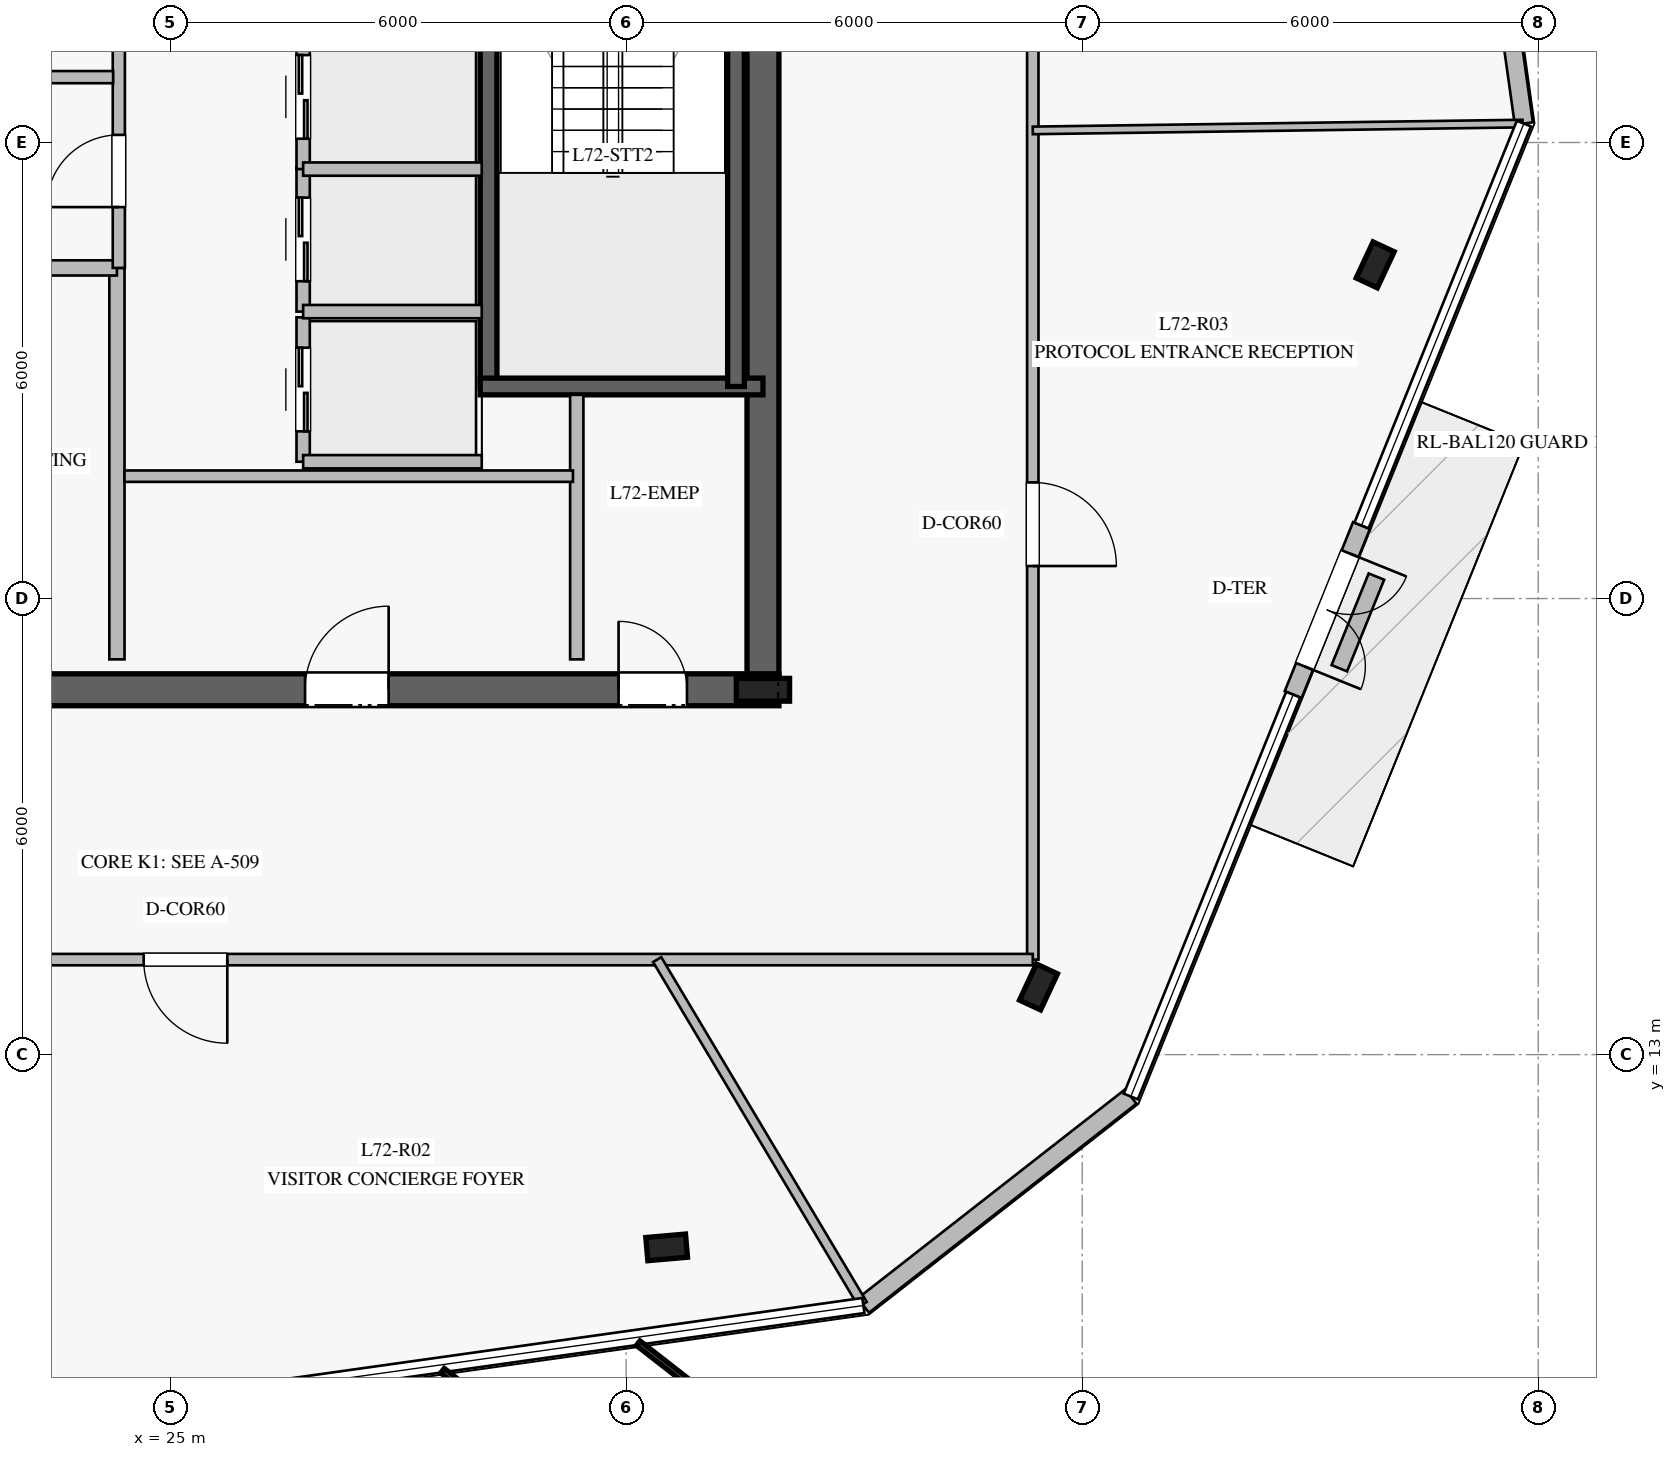
"""IFC4 building model, lengths in metres.
Left out: names, types, materials, properties, quantities, classifications, styles, units other than length and angle.
Written with IfcOpenShell. Run it as: python <this file> out.ifc"""

import sys

from ifc_helpers import new_model, si_unit, direction, frame, frame_2d, origin, origin_2d, place, context, subcontext, project, spatial, rectangle, i_section, extrude, element, fill, save


model = new_model("IFC4")
c1 = context("Model", 3, precision=1e-05, world=origin(), true_north=direction((0.0, 1.0)))
c2 = subcontext(c1, "Body", "Model", "MODEL_VIEW")
j1 = project(units=[si_unit("LENGTHUNIT", "METRE"), si_unit("PLANEANGLEUNIT", "RADIAN")], contexts=[c1])
p1 = place(None, origin())
s1 = spatial("IfcSite", under=j1, at=p1, CompositionType="ELEMENT")
p2 = place(p1, origin())
s2 = spatial("IfcBuilding", under=s1, at=p2, CompositionType="ELEMENT")
p3 = place(p2, frame((0.0, 0.0, 298.2)))
s3 = spatial("IfcBuildingStorey", under=s2, at=p3, CompositionType="ELEMENT", Elevation=298.2)
p4 = place(p3, frame((16.99, 17.8, 0.0), z_axis=(0.0, 0.0, 1.0), x_axis=(1.0, 0.0, 0.0)))
e1 = element("IfcWall", 1, at=p4, inside=s3, PredefinedType="SHEAR", context=c2, shape_type="SweptSolid", body=[
    extrude(rectangle(XDim=16.02, YDim=0.42, at=frame_2d((8.01, 0.0))), origin(), (0.0, 0.0, 1.0), 3.78),
])
p5 = place(p4, frame((4.96, 0.0, 0.0)))
e2 = element("IfcOpeningElement", 2, at=p5, cuts=e1, PredefinedType="OPENING", context=c2, shape_type="SweptSolid", body=[
    extrude(rectangle(XDim=1.2, YDim=2.25, at=frame_2d((0.6, 1.125))), frame((0.0, 0.22, 0.0), z_axis=(0.0, -1.0, 0.0), x_axis=(1.0, 0.0, 0.0)), (0.0, 0.0, 1.0), 0.44),
])
p6 = place(p4, frame((13.91, 0.0, 0.0)))
e3 = element("IfcOpeningElement", 3, at=p6, cuts=e1, PredefinedType="OPENING", context=c2, shape_type="SweptSolid", body=[
    extrude(rectangle(XDim=0.9, YDim=2.1, at=frame_2d((0.45, 1.05))), frame((0.0, 0.22, 0.0), z_axis=(0.0, -1.0, 0.0), x_axis=(1.0, 0.0, 0.0)), (0.0, 0.0, 1.0), 0.44),
])
p7 = place(p4, frame((9.785, 0.0, 0.0)))
e4 = element("IfcOpeningElement", 4, at=p7, cuts=e1, PredefinedType="OPENING", context=c2, shape_type="SweptSolid", body=[
    extrude(rectangle(XDim=1.1, YDim=2.2, at=frame_2d((0.55, 1.1))), frame((0.0, 0.22, 0.0), z_axis=(0.0, -1.0, 0.0), x_axis=(1.0, 0.0, 0.0)), (0.0, 0.0, 1.0), 0.44),
])
p8 = place(p3, frame((32.8, 18.01, 0.0), z_axis=(0.0, 0.0, 1.0), x_axis=(0.0, 1.0, 0.0)))
e5 = element("IfcWall", 5, at=p8, inside=s3, PredefinedType="SHEAR", context=c2, shape_type="SweptSolid", body=[
    extrude(rectangle(XDim=13.98, YDim=0.42, at=frame_2d((6.99, 0.0))), origin(), (0.0, 0.0, 1.0), 3.78),
])
p9 = place(p3, frame((32.8, 17.8, 0.0), z_axis=(0.0, 0.0, 1.0), x_axis=(1.0, 0.0, 0.0)))
e6 = element("IfcColumn", 6, at=p9, inside=s3, PredefinedType="COLUMN", context=c2, shape_type="SweptSolid", body=[
    extrude(i_section(OverallWidth=0.3, OverallDepth=0.7, WebThickness=0.017, FlangeThickness=0.032, at=origin_2d()), origin(), (0.0, 0.0, 1.0), 4.0),
])
p10 = place(p3, frame((29.19, 21.79, 0.0), z_axis=(0.0, 0.0, 1.0), x_axis=(0.0, 1.0, 0.0)))
e7 = element("IfcWall", 7, at=p10, inside=s3, PredefinedType="SOLIDWALL", context=c2, shape_type="SweptSolid", body=[
    extrude(rectangle(XDim=7.22, YDim=0.22, at=frame_2d((3.61, 0.0))), origin(), (0.0, 0.0, 1.0), 3.78),
])
p11 = place(p10, frame((5.88, 0.0, 0.0)))
e8 = element("IfcOpeningElement", 8, at=p11, cuts=e7, PredefinedType="OPENING", context=c2, shape_type="SweptSolid", body=[
    extrude(rectangle(XDim=1.15, YDim=2.2, at=frame_2d((0.575, 1.1))), frame((0.0, 0.12, 0.0), z_axis=(0.0, -1.0, 0.0), x_axis=(1.0, 0.0, 0.0)), (0.0, 0.0, 1.0), 0.24),
])
p12 = place(p3, frame((29.08, 21.79, 0.0), z_axis=(0.0, 0.0, 1.0), x_axis=(1.0, 0.0, 0.0)))
e9 = element("IfcWall", 9, at=p12, inside=s3, PredefinedType="SOLIDWALL", context=c2, shape_type="SweptSolid", body=[
    extrude(rectangle(XDim=3.72, YDim=0.22, at=frame_2d((1.86, 0.0))), origin(), (0.0, 0.0, 1.0), 3.78),
])
p13 = place(p3, frame((32.445, 29.01, 0.0), z_axis=(0.0, 0.0, 1.0), x_axis=(0.0, -1.0, 0.0)))
e10 = element("IfcWall", 10, at=p13, inside=s3, PredefinedType="SOLIDWALL", context=c2, shape_type="SweptSolid", body=[
    extrude(rectangle(XDim=7.22, YDim=0.22, at=frame_2d((3.61, 0.0))), origin(), (0.0, 0.0, 1.0), 3.78),
])
for number, where, z_axis, x_axis in (
    (11, (31.533, 10.464, 0.0), (0.0, 0.0, 1.0), (0.996, 0.087, 0.0)),
    (12, (36.425, 13.89, 0.0), (0.0, 0.0, 1.0), (0.423, 0.906, 0.0)),
    (13, (40.855, 23.39, 0.0), (0.0, 0.0, 1.0), (0.423, 0.906, 0.0)),
):
    element("IfcColumn", number, at=place(p3, frame(where, z_axis=z_axis, x_axis=x_axis)), inside=s3, PredefinedType="COLUMN", context=c2, shape_type="SweptSolid", body=[
        extrude(i_section(OverallWidth=0.306, OverallDepth=0.524, WebThickness=0.021, FlangeThickness=0.04, at=origin_2d()), origin(), (0.0, 0.0, 1.0), 4.0),
    ])
p14 = place(p3, frame((34.121, 9.699, 0.0), z_axis=(0.0, 0.0, 1.0), x_axis=(0.78792242083, 0.615774519408, 0.0)))
e14 = element("IfcWall", 14, at=p14, inside=s3, PredefinedType="STANDARD", context=c2, shape_type="SweptSolid", body=[
    extrude(rectangle(XDim=4.466, YDim=0.24, at=frame_2d((2.233, 0.0))), origin(), (0.0, 0.0, 1.0), 3.78),
])
p15 = place(p3, frame((39.776, 17.736, 0.0), z_axis=(0.0, 0.0, 1.0), x_axis=(0.374703586724, 0.927144660825, 0.0)))
e15 = element("IfcWall", 15, at=p15, inside=s3, PredefinedType="STANDARD", context=c2, shape_type="SweptSolid", body=[
    extrude(rectangle(XDim=2.4, YDim=0.24, at=frame_2d((1.2, 0.0))), origin(), (0.0, 0.0, 1.0), 3.78),
])
p16 = place(p15, frame((0.4, 0.0, 0.0)))
e16 = element("IfcOpeningElement", 16, at=p16, cuts=e15, PredefinedType="OPENING", context=c2, shape_type="SweptSolid", body=[
    extrude(rectangle(XDim=1.6, YDim=2.25, at=frame_2d((0.8, 1.125))), frame((0.0, 0.13, 0.0), z_axis=(0.0, -1.0, 0.0), x_axis=(1.0, 0.0, 0.0)), (0.0, 0.0, 1.0), 0.26),
])
p17 = place(p3, frame((42.811, 25.249, 0.0), z_axis=(0.0, 0.0, 1.0), x_axis=(-0.139124115192, 0.990274952007, 0.0)))
e17 = element("IfcWall", 17, at=p17, inside=s3, PredefinedType="STANDARD", context=c2, shape_type="SweptSolid", body=[
    extrude(rectangle(XDim=4.464, YDim=0.24, at=frame_2d((2.232, 0.0))), origin(), (0.0, 0.0, 1.0), 3.78),
])
p18 = place(p3, frame((40.383, 18.083, 0.0), z_axis=(0.0, 0.0, 1.0), x_axis=(0.375108300877, 0.926980993663, 0.0)))
e18 = element("IfcWall", 18, at=p18, inside=s3, PredefinedType="USERDEFINED", context=c2, shape_type="SweptSolid", body=[
    extrude(rectangle(XDim=1.301, YDim=0.22, at=frame_2d((0.65, 0.0))), origin(), (0.0, 0.0, 1.0), 0.4),
])
p19 = place(p3, frame((24.3, 18.2, 0.0), z_axis=(0.0, 0.0, 1.0), x_axis=(0.0, 1.0, 0.0)))
e19 = element("IfcWall", 19, at=p19, inside=s3, PredefinedType="PARTITIONING", context=c2, shape_type="SweptSolid", body=[
    extrude(rectangle(XDim=5.15, YDim=0.2, at=frame_2d((2.575, 0.0))), origin(), (0.0, 0.0, 1.0), 3.78),
])
p20 = place(p3, frame((20.92, 23.35, 0.0), z_axis=(0.0, 0.0, 1.0), x_axis=(1.0, 0.0, 0.0)))
e20 = element("IfcWall", 20, at=p20, inside=s3, PredefinedType="PARTITIONING", context=c2, shape_type="SweptSolid", body=[
    extrude(rectangle(XDim=3.38, YDim=0.2, at=frame_2d((1.69, 0.0))), origin(), (0.0, 0.0, 1.0), 3.78),
])
p21 = place(p3, frame((24.325, 23.35, 0.0), z_axis=(0.0, 0.0, 1.0), x_axis=(0.0, 1.0, 0.0)))
e21 = element("IfcWall", 21, at=p21, inside=s3, PredefinedType="PLUMBINGWALL", context=c2, shape_type="SweptSolid", body=[
    extrude(rectangle(XDim=4.93, YDim=0.16, at=frame_2d((2.465, 0.0))), origin(), (0.0, 0.0, 1.0), 3.78),
])
p22 = place(p21, frame((0.8, 0.0, 0.0)))
e22 = element("IfcOpeningElement", 22, at=p22, cuts=e21, PredefinedType="OPENING", context=c2, shape_type="SweptSolid", body=[
    extrude(rectangle(XDim=0.95, YDim=2.1, at=frame_2d((0.475, 1.05))), frame((0.0, 0.09, 0.0), z_axis=(0.0, -1.0, 0.0), x_axis=(1.0, 0.0, 0.0)), (0.0, 0.0, 1.0), 0.18),
])
p23 = place(p21, frame((3.26, 0.0, 0.0)))
e23 = element("IfcOpeningElement", 23, at=p23, cuts=e21, PredefinedType="OPENING", context=c2, shape_type="SweptSolid", body=[
    extrude(rectangle(XDim=0.9, YDim=2.1, at=frame_2d((0.45, 1.05))), frame((0.0, 0.09, 0.0), z_axis=(0.0, -1.0, 0.0), x_axis=(1.0, 0.0, 0.0)), (0.0, 0.0, 1.0), 0.18),
])
p24 = place(p3, frame((20.95, 25.86, 0.0), z_axis=(0.0, 0.0, 1.0), x_axis=(1.0, 0.0, 0.0)))
e24 = element("IfcWall", 24, at=p24, inside=s3, PredefinedType="PLUMBINGWALL", context=c2, shape_type="SweptSolid", body=[
    extrude(rectangle(XDim=3.3, YDim=0.16, at=frame_2d((1.65, 0.0))), origin(), (0.0, 0.0, 1.0), 3.78),
])
p25 = place(p3, frame((30.35, 18.2, 0.0), z_axis=(0.0, 0.0, 1.0), x_axis=(0.0, 1.0, 0.0)))
e25 = element("IfcWall", 25, at=p25, inside=s3, PredefinedType="PARTITIONING", context=c2, shape_type="SweptSolid", body=[
    extrude(rectangle(XDim=3.48, YDim=0.175, at=frame_2d((1.74, 0.0))), origin(), (0.0, 0.0, 1.0), 3.78),
])
p26 = place(p3, frame((24.4, 20.61, 0.0), z_axis=(0.0, 0.0, 1.0), x_axis=(1.0, 0.0, 0.0)))
e26 = element("IfcWall", 26, at=p26, inside=s3, PredefinedType="PARTITIONING", context=c2, shape_type="SweptSolid", body=[
    extrude(rectangle(XDim=5.9, YDim=0.15, at=frame_2d((2.95, 0.0))), origin(), (0.0, 0.0, 1.0), 3.78),
])
p27 = place(p3, frame((26.75, 20.8, 0.0), z_axis=(0.0, 0.0, 1.0), x_axis=(0.0, 1.0, 0.0)))
e27 = element("IfcWall", 27, at=p27, inside=s3, PredefinedType="PARTITIONING", context=c2, shape_type="SweptSolid", body=[
    extrude(rectangle(XDim=1.9, YDim=0.175, at=frame_2d((0.95, 0.0))), origin(), (0.0, 0.0, 1.0), 3.78),
])
p28 = place(p27, frame((0.4, 0.0, 0.0)))
e28 = element("IfcOpeningElement", 28, at=p28, cuts=e27, PredefinedType="OPENING", context=c2, shape_type="SweptSolid", body=[
    extrude(rectangle(XDim=1.1, YDim=2.2, at=frame_2d((0.55, 1.1))), frame((0.0, 0.098, 0.0), z_axis=(0.0, -1.0, 0.0), x_axis=(1.0, 0.0, 0.0)), (0.0, 0.0, 1.0), 0.195),
])
p29 = place(p3, frame((26.75, 20.8, 0.0), z_axis=(0.0, 0.0, 1.0), x_axis=(1.0, 0.0, 0.0)))
e29 = element("IfcWall", 29, at=p29, inside=s3, PredefinedType="PARTITIONING", context=c2, shape_type="SweptSolid", body=[
    extrude(rectangle(XDim=2.35, YDim=0.175, at=frame_2d((1.175, 0.0))), origin(), (0.0, 0.0, 1.0), 3.78),
])
p30 = place(p3, frame((26.75, 22.775, 0.0), z_axis=(0.0, 0.0, 1.0), x_axis=(0.0, 1.0, 0.0)))
e30 = element("IfcWall", 30, at=p30, inside=s3, PredefinedType="PARTITIONING", context=c2, shape_type="SweptSolid", body=[
    extrude(rectangle(XDim=1.9, YDim=0.175, at=frame_2d((0.95, 0.0))), origin(), (0.0, 0.0, 1.0), 3.78),
])
p31 = place(p30, frame((0.4, 0.0, 0.0)))
e31 = element("IfcOpeningElement", 31, at=p31, cuts=e30, PredefinedType="OPENING", context=c2, shape_type="SweptSolid", body=[
    extrude(rectangle(XDim=1.1, YDim=2.2, at=frame_2d((0.55, 1.1))), frame((0.0, 0.098, 0.0), z_axis=(0.0, -1.0, 0.0), x_axis=(1.0, 0.0, 0.0)), (0.0, 0.0, 1.0), 0.195),
])
p32 = place(p3, frame((26.75, 22.775, 0.0), z_axis=(0.0, 0.0, 1.0), x_axis=(1.0, 0.0, 0.0)))
e32 = element("IfcWall", 32, at=p32, inside=s3, PredefinedType="PARTITIONING", context=c2, shape_type="SweptSolid", body=[
    extrude(rectangle(XDim=2.35, YDim=0.175, at=frame_2d((1.175, 0.0))), origin(), (0.0, 0.0, 1.0), 3.78),
])
p33 = place(p3, frame((26.75, 24.65, 0.0), z_axis=(0.0, 0.0, 1.0), x_axis=(0.0, 1.0, 0.0)))
e33 = element("IfcWall", 33, at=p33, inside=s3, PredefinedType="PARTITIONING", context=c2, shape_type="SweptSolid", body=[
    extrude(rectangle(XDim=1.9, YDim=0.175, at=frame_2d((0.95, 0.0))), origin(), (0.0, 0.0, 1.0), 3.78),
])
p34 = place(p33, frame((0.4, 0.0, 0.0)))
e34 = element("IfcOpeningElement", 34, at=p34, cuts=e33, PredefinedType="OPENING", context=c2, shape_type="SweptSolid", body=[
    extrude(rectangle(XDim=1.1, YDim=2.2, at=frame_2d((0.55, 1.1))), frame((0.0, 0.098, 0.0), z_axis=(0.0, -1.0, 0.0), x_axis=(1.0, 0.0, 0.0)), (0.0, 0.0, 1.0), 0.195),
])
p35 = place(p3, frame((26.75, 24.65, 0.0), z_axis=(0.0, 0.0, 1.0), x_axis=(1.0, 0.0, 0.0)))
e35 = element("IfcWall", 35, at=p35, inside=s3, PredefinedType="PARTITIONING", context=c2, shape_type="SweptSolid", body=[
    extrude(rectangle(XDim=2.35, YDim=0.175, at=frame_2d((1.175, 0.0))), origin(), (0.0, 0.0, 1.0), 3.78),
])
p36 = place(p3, frame((36.35, 35.75, 0.0), z_axis=(0.0, 0.0, 1.0), x_axis=(0.0, -1.0, 0.0)))
e36 = element("IfcWall", 36, at=p36, inside=s3, PredefinedType="PARTITIONING", context=c2, shape_type="SweptSolid", body=[
    extrude(rectangle(XDim=21.5, YDim=0.15, at=frame_2d((10.75, 0.0))), origin(), (0.0, 0.0, 1.0), 3.25),
])
p37 = place(p36, frame((15.222, 0.0, 0.0)))
e37 = element("IfcOpeningElement", 37, at=p37, cuts=e36, PredefinedType="OPENING", context=c2, shape_type="SweptSolid", body=[
    extrude(rectangle(XDim=1.1, YDim=2.2, at=frame_2d((0.55, 1.1))), frame((0.0, 0.085, 0.0), z_axis=(0.0, -1.0, 0.0), x_axis=(1.0, 0.0, 0.0)), (0.0, 0.0, 1.0), 0.17),
])
p38 = place(p3, frame((36.35, 14.25, 0.0), z_axis=(0.0, 0.0, 1.0), x_axis=(-1.0, 0.0, 0.0)))
e38 = element("IfcWall", 38, at=p38, inside=s3, PredefinedType="PARTITIONING", context=c2, shape_type="SweptSolid", body=[
    extrude(rectangle(XDim=22.7, YDim=0.15, at=frame_2d((11.35, 0.0))), origin(), (0.0, 0.0, 1.0), 3.28),
])
p39 = place(p38, frame((19.318, 0.0, 0.0)))
e39 = element("IfcOpeningElement", 39, at=p39, cuts=e38, PredefinedType="OPENING", context=c2, shape_type="SweptSolid", body=[
    extrude(rectangle(XDim=1.1, YDim=2.2, at=frame_2d((0.55, 1.1))), frame((0.0, 0.085, 0.0), z_axis=(0.0, -1.0, 0.0), x_axis=(1.0, 0.0, 0.0)), (0.0, 0.0, 1.0), 0.17),
])
p40 = place(p38, frame((10.598, 0.0, 0.0)))
e40 = element("IfcOpeningElement", 40, at=p40, cuts=e38, PredefinedType="OPENING", context=c2, shape_type="SweptSolid", body=[
    extrude(rectangle(XDim=1.1, YDim=2.2, at=frame_2d((0.55, 1.1))), frame((0.0, 0.085, 0.0), z_axis=(0.0, -1.0, 0.0), x_axis=(1.0, 0.0, 0.0)), (0.0, 0.0, 1.0), 0.17),
])
p41 = place(p3, frame((31.408, 14.25, 0.0), z_axis=(0.0, 0.0, 1.0), x_axis=(0.512066510175, -0.858945801059, 0.0)))
e41 = element("IfcWall", 41, at=p41, inside=s3, PredefinedType="PARTITIONING", context=c2, shape_type="SweptSolid", body=[
    extrude(rectangle(XDim=5.281, YDim=0.125, at=frame_2d((2.64, 0.0))), origin(), (0.0, 0.0, 1.0), 3.28),
])
p42 = place(p3, frame((36.35, 25.159, 0.0), z_axis=(0.0, 0.0, 1.0), x_axis=(0.999902287831, 0.013979084042, 0.0)))
e42 = element("IfcWall", 42, at=p42, inside=s3, PredefinedType="MOVABLE", context=c2, shape_type="SweptSolid", body=[
    extrude(rectangle(XDim=6.445, YDim=0.1, at=frame_2d((3.222, 0.0))), origin(), (0.0, 0.0, 1.0), 3.28),
])
p43 = place(p16, frame((1.6, 0.0, 0.0), z_axis=(0.0, 0.0, 1.0), x_axis=(-1.0, 0.0, 0.0)))
e43 = element("IfcDoor", 43, at=p43, inside=s3, OperationType="DOUBLE_DOOR_SINGLE_SWING", PredefinedType="DOOR", context=c2, shape_type="SweptSolid", body=[
    extrude(rectangle(XDim=1.6, YDim=2.25, at=frame_2d((0.8, 1.125))), frame((0.0, 0.025, 0.0), z_axis=(0.0, -1.0, 0.0), x_axis=(1.0, 0.0, 0.0)), (0.0, 0.0, 1.0), 0.05),
])
fill(e16, e43)
p44 = place(p22, origin())
e44 = element("IfcDoor", 44, at=p44, inside=s3, OperationType="SINGLE_SWING_LEFT", PredefinedType="DOOR", context=c2, shape_type="SweptSolid", body=[
    extrude(rectangle(XDim=0.95, YDim=2.1, at=frame_2d((0.475, 1.05))), frame((0.0, 0.025, 0.0), z_axis=(0.0, -1.0, 0.0), x_axis=(1.0, 0.0, 0.0)), (0.0, 0.0, 1.0), 0.05),
])
fill(e22, e44)
p45 = place(p6, origin())
e45 = element("IfcDoor", 45, at=p45, inside=s3, OperationType="SINGLE_SWING_LEFT", PredefinedType="DOOR", context=c2, shape_type="SweptSolid", body=[
    extrude(rectangle(XDim=0.9, YDim=2.1, at=frame_2d((0.45, 1.05))), frame((0.0, 0.025, 0.0), z_axis=(0.0, -1.0, 0.0), x_axis=(1.0, 0.0, 0.0)), (0.0, 0.0, 1.0), 0.05),
])
fill(e3, e45)
p46 = place(p7, origin())
e46 = element("IfcDoor", 46, at=p46, inside=s3, OperationType="SINGLE_SWING_RIGHT", PredefinedType="DOOR", context=c2, shape_type="SweptSolid", body=[
    extrude(rectangle(XDim=1.1, YDim=2.2, at=frame_2d((0.55, 1.1))), frame((0.0, 0.025, 0.0), z_axis=(0.0, -1.0, 0.0), x_axis=(1.0, 0.0, 0.0)), (0.0, 0.0, 1.0), 0.05),
])
fill(e4, e46)
p47 = place(p28, origin())
e47 = element("IfcDoor", 47, at=p47, inside=s3, OperationType="DOUBLE_DOOR_SLIDING", PredefinedType="DOOR", context=c2, shape_type="SweptSolid", body=[
    extrude(rectangle(XDim=1.1, YDim=2.2, at=frame_2d((0.55, 1.1))), frame((0.0, 0.025, 0.0), z_axis=(0.0, -1.0, 0.0), x_axis=(1.0, 0.0, 0.0)), (0.0, 0.0, 1.0), 0.05),
])
fill(e28, e47)
p48 = place(p31, origin())
e48 = element("IfcDoor", 48, at=p48, inside=s3, OperationType="DOUBLE_DOOR_SLIDING", PredefinedType="DOOR", context=c2, shape_type="SweptSolid", body=[
    extrude(rectangle(XDim=1.1, YDim=2.2, at=frame_2d((0.55, 1.1))), frame((0.0, 0.025, 0.0), z_axis=(0.0, -1.0, 0.0), x_axis=(1.0, 0.0, 0.0)), (0.0, 0.0, 1.0), 0.05),
])
fill(e31, e48)
p49 = place(p34, origin())
e49 = element("IfcDoor", 49, at=p49, inside=s3, OperationType="DOUBLE_DOOR_SLIDING", PredefinedType="DOOR", context=c2, shape_type="SweptSolid", body=[
    extrude(rectangle(XDim=1.1, YDim=2.2, at=frame_2d((0.55, 1.1))), frame((0.0, 0.025, 0.0), z_axis=(0.0, -1.0, 0.0), x_axis=(1.0, 0.0, 0.0)), (0.0, 0.0, 1.0), 0.05),
])
fill(e34, e49)
p50 = place(p40, origin())
e50 = element("IfcDoor", 50, at=p50, inside=s3, OperationType="SINGLE_SWING_LEFT", PredefinedType="DOOR", context=c2, shape_type="SweptSolid", body=[
    extrude(rectangle(XDim=1.1, YDim=2.2, at=frame_2d((0.55, 1.1))), frame((0.0, 0.025, 0.0), z_axis=(0.0, -1.0, 0.0), x_axis=(1.0, 0.0, 0.0)), (0.0, 0.0, 1.0), 0.05),
])
fill(e40, e50)
p51 = place(p37, origin())
e51 = element("IfcDoor", 51, at=p51, inside=s3, OperationType="SINGLE_SWING_RIGHT", PredefinedType="DOOR", context=c2, shape_type="SweptSolid", body=[
    extrude(rectangle(XDim=1.1, YDim=2.2, at=frame_2d((0.55, 1.1))), frame((0.0, 0.025, 0.0), z_axis=(0.0, -1.0, 0.0), x_axis=(1.0, 0.0, 0.0)), (0.0, 0.0, 1.0), 0.05),
])
fill(e37, e51)
save(model, sys.argv[1])
